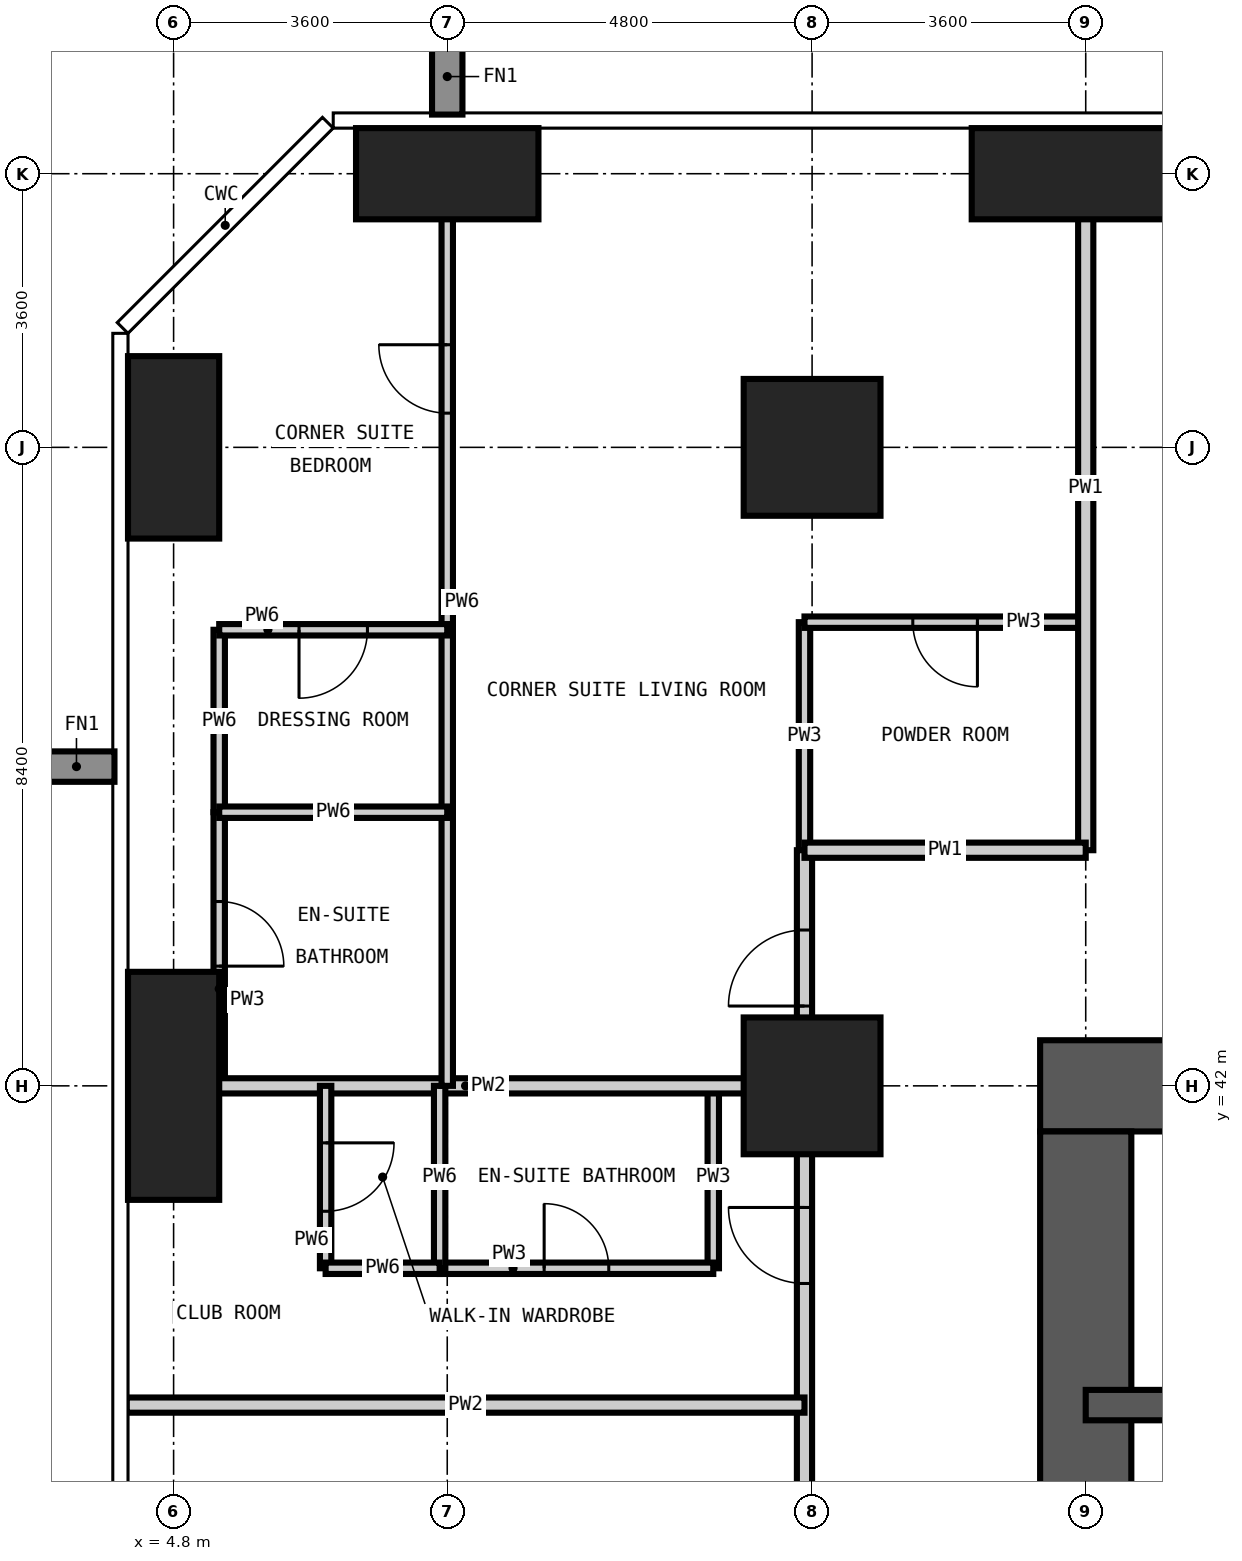
"""IFC4 building model, lengths in metres.
Left out: names, types, materials, properties, quantities, classifications, styles, units other than length and angle.
Written with IfcOpenShell. Run it as: python <this file> out.ifc"""

import sys

from ifc_helpers import new_model, si_unit, direction, frame, frame_2d, origin, origin_2d, place, context, subcontext, project, spatial, rectangle, extrude, element, fill, save


model = new_model("IFC4")
c1 = context("Model", 3, precision=1e-05, world=origin(), true_north=direction((0.0, 1.0)))
c2 = subcontext(c1, "Body", "Model", "MODEL_VIEW")
j1 = project(units=[si_unit("LENGTHUNIT", "METRE"), si_unit("PLANEANGLEUNIT", "RADIAN")], contexts=[c1])
p1 = place(None, origin())
s1 = spatial("IfcSite", under=j1, at=p1, CompositionType="ELEMENT")
p2 = place(p1, origin())
s2 = spatial("IfcBuilding", under=s1, at=p2, CompositionType="ELEMENT")
p3 = place(p2, frame((0.0, 0.0, 216.6)))
s3 = spatial("IfcBuildingStorey", under=s2, at=p3, CompositionType="ELEMENT", Elevation=216.6)
p4 = place(p3, frame((4.8, 42.0, -0.35), z_axis=(0.0, 0.0, 1.0), x_axis=(1.0, 0.0, 0.0)))
e1 = element("IfcColumn", 1, at=p4, inside=s3, PredefinedType="COLUMN", context=c2, shape_type="SweptSolid", body=[
    extrude(rectangle(XDim=1.2, YDim=3.0, at=origin_2d()), origin(), (0.0, 0.0, 1.0), 3.55),
])
p5 = place(p3, frame((4.8, 50.4, -0.35), z_axis=(0.0, 0.0, 1.0), x_axis=(1.0, 0.0, 0.0)))
e2 = element("IfcColumn", 2, at=p5, inside=s3, PredefinedType="COLUMN", context=c2, shape_type="SweptSolid", body=[
    extrude(rectangle(XDim=1.2, YDim=2.4, at=origin_2d()), origin(), (0.0, 0.0, 1.0), 3.55),
])
p6 = place(p3, frame((8.4, 54.0, -0.35), z_axis=(0.0, 0.0, 1.0), x_axis=(1.0, 0.0, 0.0)))
e3 = element("IfcColumn", 3, at=p6, inside=s3, PredefinedType="COLUMN", context=c2, shape_type="SweptSolid", body=[
    extrude(rectangle(XDim=2.4, YDim=1.2, at=origin_2d()), origin(), (0.0, 0.0, 1.0), 3.55),
])
for number, where, z_axis, x_axis in (
    (4, (13.2, 42.0, -0.35), (0.0, 0.0, 1.0), (1.0, 0.0, 0.0)),
    (5, (13.2, 50.4, -0.35), (0.0, 0.0, 1.0), (1.0, 0.0, 0.0)),
):
    element("IfcColumn", number, at=place(p3, frame(where, z_axis=z_axis, x_axis=x_axis)), inside=s3, PredefinedType="COLUMN", context=c2, shape_type="SweptSolid", body=[
        extrude(rectangle(XDim=1.8, YDim=1.8, at=origin_2d()), origin(), (0.0, 0.0, 1.0), 3.55),
    ])
p7 = place(p3, frame((16.8, 54.0, -0.35), z_axis=(0.0, 0.0, 1.0), x_axis=(1.0, 0.0, 0.0)))
e6 = element("IfcColumn", 6, at=p7, inside=s3, PredefinedType="COLUMN", context=c2, shape_type="SweptSolid", body=[
    extrude(rectangle(XDim=3.0, YDim=1.2, at=origin_2d()), origin(), (0.0, 0.0, 1.0), 3.55),
])
p8 = place(p3, frame((42.6, 42.0, -0.35), z_axis=(0.0, 0.0, 1.0), x_axis=(-1.0, 0.0, 0.0)))
e7 = element("IfcWall", 7, at=p8, inside=s3, PredefinedType="SHEAR", context=c2, shape_type="SweptSolid", body=[
    extrude(rectangle(XDim=26.4, YDim=1.2, at=frame_2d((13.2, 0.0))), origin(), (0.0, 0.0, 1.0), 3.55),
])
p9 = place(p8, frame((21.1, 0.0, 0.35)))
e8 = element("IfcOpeningElement", 8, at=p9, cuts=e7, PredefinedType="OPENING", context=c2, shape_type="SweptSolid", body=[
    extrude(rectangle(XDim=1.0, YDim=2.1, at=frame_2d((0.5, 1.05))), frame((0.0, 0.61, 0.0), z_axis=(0.0, -1.0, 0.0), x_axis=(1.0, 0.0, 0.0)), (0.0, 0.0, 1.0), 1.22),
])
p10 = place(p8, frame((10.5, 0.0, 0.35)))
e9 = element("IfcOpeningElement", 9, at=p10, cuts=e7, PredefinedType="OPENING", context=c2, shape_type="SweptSolid", body=[
    extrude(rectangle(XDim=1.2, YDim=2.2, at=frame_2d((0.6, 1.1))), frame((0.0, 0.61, 0.0), z_axis=(0.0, -1.0, 0.0), x_axis=(1.0, 0.0, 0.0)), (0.0, 0.0, 1.0), 1.22),
])
p11 = place(p3, frame((16.8, 41.4, -0.35), z_axis=(0.0, 0.0, 1.0), x_axis=(0.0, -1.0, 0.0)))
e10 = element("IfcWall", 10, at=p11, inside=s3, PredefinedType="SHEAR", context=c2, shape_type="SweptSolid", body=[
    extrude(rectangle(XDim=24.0, YDim=1.2, at=frame_2d((12.0, 0.0))), origin(), (0.0, 0.0, 1.0), 3.55),
])
p12 = place(p11, frame((11.1, 0.0, 0.35)))
e11 = element("IfcOpeningElement", 11, at=p12, cuts=e10, PredefinedType="OPENING", context=c2, shape_type="SweptSolid", body=[
    extrude(rectangle(XDim=1.8, YDim=2.2, at=frame_2d((0.9, 1.1))), frame((0.0, 0.61, 0.0), z_axis=(0.0, -1.0, 0.0), x_axis=(1.0, 0.0, 0.0)), (0.0, 0.0, 1.0), 1.22),
])
p13 = place(p11, frame((19.9, 0.0, 0.35)))
e12 = element("IfcOpeningElement", 12, at=p13, cuts=e10, PredefinedType="OPENING", context=c2, shape_type="SweptSolid", body=[
    extrude(rectangle(XDim=1.0, YDim=2.1, at=frame_2d((0.5, 1.05))), frame((0.0, 0.61, 0.0), z_axis=(0.0, -1.0, 0.0), x_axis=(1.0, 0.0, 0.0)), (0.0, 0.0, 1.0), 1.22),
])
p14 = place(p11, frame((5.2, 0.0, 0.35)))
e13 = element("IfcOpeningElement", 13, at=p14, cuts=e10, PredefinedType="OPENING", context=c2, shape_type="SweptSolid", body=[
    extrude(rectangle(XDim=1.0, YDim=2.1, at=frame_2d((0.5, 1.05))), frame((0.0, 0.61, 0.0), z_axis=(0.0, -1.0, 0.0), x_axis=(1.0, 0.0, 0.0)), (0.0, 0.0, 1.0), 1.22),
])
p15 = place(p3, frame((16.8, 37.8, -0.35), z_axis=(0.0, 0.0, 1.0), x_axis=(1.0, 0.0, 0.0)))
e14 = element("IfcWall", 14, at=p15, inside=s3, PredefinedType="SHEAR", context=c2, shape_type="SweptSolid", body=[
    extrude(rectangle(XDim=8.4, YDim=0.4, at=frame_2d((4.2, 0.0))), origin(), (0.0, 0.0, 1.0), 3.55),
])
p16 = place(p3, frame((5.4, 42.0, 0.0), z_axis=(0.0, 0.0, 1.0), x_axis=(0.0, 1.0, 0.0)))
e15 = element("IfcWall", 15, at=p16, inside=s3, PredefinedType="PARTITIONING", context=c2, shape_type="SweptSolid", body=[
    extrude(rectangle(XDim=3.6, YDim=0.15, at=frame_2d((1.8, 0.0))), origin(), (0.0, 0.0, 1.0), 3.2),
])
p17 = place(p16, frame((1.575, 0.0, 0.0)))
e16 = element("IfcOpeningElement", 16, at=p17, cuts=e15, PredefinedType="OPENING", context=c2, shape_type="SweptSolid", body=[
    extrude(rectangle(XDim=0.85, YDim=2.1, at=frame_2d((0.425, 1.05))), frame((0.0, 0.085, 0.0), z_axis=(0.0, -1.0, 0.0), x_axis=(1.0, 0.0, 0.0)), (0.0, 0.0, 1.0), 0.17),
])
p18 = place(p3, frame((11.9, 39.6, 0.0), z_axis=(0.0, 0.0, 1.0), x_axis=(0.0, 1.0, 0.0)))
e17 = element("IfcWall", 17, at=p18, inside=s3, PredefinedType="PARTITIONING", context=c2, shape_type="SweptSolid", body=[
    extrude(rectangle(XDim=2.4, YDim=0.15, at=frame_2d((1.2, 0.0))), origin(), (0.0, 0.0, 1.0), 3.2),
])
p19 = place(p3, frame((13.1, 45.1, 0.0), z_axis=(0.0, 0.0, 1.0), x_axis=(0.0, 1.0, 0.0)))
e18 = element("IfcWall", 18, at=p19, inside=s3, PredefinedType="PARTITIONING", context=c2, shape_type="SweptSolid", body=[
    extrude(rectangle(XDim=3.0, YDim=0.15, at=frame_2d((1.5, 0.0))), origin(), (0.0, 0.0, 1.0), 3.2),
])
p20 = place(p3, frame((8.3, 39.6, 0.0), z_axis=(0.0, 0.0, 1.0), x_axis=(1.0, 0.0, 0.0)))
e19 = element("IfcWall", 19, at=p20, inside=s3, PredefinedType="PARTITIONING", context=c2, shape_type="SweptSolid", body=[
    extrude(rectangle(XDim=3.6, YDim=0.15, at=frame_2d((1.8, 0.0))), origin(), (0.0, 0.0, 1.0), 3.2),
])
p21 = place(p20, frame((1.375, 0.0, 0.0)))
e20 = element("IfcOpeningElement", 20, at=p21, cuts=e19, PredefinedType="OPENING", context=c2, shape_type="SweptSolid", body=[
    extrude(rectangle(XDim=0.85, YDim=2.1, at=frame_2d((0.425, 1.05))), frame((0.0, 0.085, 0.0), z_axis=(0.0, -1.0, 0.0), x_axis=(1.0, 0.0, 0.0)), (0.0, 0.0, 1.0), 0.17),
])
p22 = place(p3, frame((13.1, 48.1, 0.0), z_axis=(0.0, 0.0, 1.0), x_axis=(1.0, 0.0, 0.0)))
e21 = element("IfcWall", 21, at=p22, inside=s3, PredefinedType="PARTITIONING", context=c2, shape_type="SweptSolid", body=[
    extrude(rectangle(XDim=3.7, YDim=0.15, at=frame_2d((1.85, 0.0))), origin(), (0.0, 0.0, 1.0), 3.2),
])
p23 = place(p22, frame((1.425, 0.0, 0.0)))
e22 = element("IfcOpeningElement", 22, at=p23, cuts=e21, PredefinedType="OPENING", context=c2, shape_type="SweptSolid", body=[
    extrude(rectangle(XDim=0.85, YDim=2.1, at=frame_2d((0.425, 1.05))), frame((0.0, 0.085, 0.0), z_axis=(0.0, -1.0, 0.0), x_axis=(1.0, 0.0, 0.0)), (0.0, 0.0, 1.0), 0.17),
])
p24 = place(p3, frame((13.1, 13.1, 0.0), z_axis=(0.0, 0.0, 1.0), x_axis=(0.0, 1.0, 0.0)))
e23 = element("IfcWall", 23, at=p24, inside=s3, PredefinedType="PARTITIONING", context=c2, shape_type="SweptSolid", body=[
    extrude(rectangle(XDim=32.0, YDim=0.2, at=frame_2d((16.0, 0.0))), origin(), (0.0, 0.0, 1.0), 3.2),
])
p25 = place(p24, frame((5.3, 0.0, 0.0)))
e24 = element("IfcOpeningElement", 24, at=p25, cuts=e23, PredefinedType="OPENING", context=c2, shape_type="SweptSolid", body=[
    extrude(rectangle(XDim=1.0, YDim=2.2, at=frame_2d((0.5, 1.1))), frame((0.0, 0.11, 0.0), z_axis=(0.0, -1.0, 0.0), x_axis=(1.0, 0.0, 0.0)), (0.0, 0.0, 1.0), 0.22),
])
p26 = place(p24, frame((13.1, 0.0, 0.0)))
e25 = element("IfcOpeningElement", 25, at=p26, cuts=e23, PredefinedType="OPENING", context=c2, shape_type="SweptSolid", body=[
    extrude(rectangle(XDim=1.0, YDim=2.2, at=frame_2d((0.5, 1.1))), frame((0.0, 0.11, 0.0), z_axis=(0.0, -1.0, 0.0), x_axis=(1.0, 0.0, 0.0)), (0.0, 0.0, 1.0), 0.22),
])
p27 = place(p24, frame((18.5, 0.0, 0.0)))
e26 = element("IfcOpeningElement", 26, at=p27, cuts=e23, PredefinedType="OPENING", context=c2, shape_type="SweptSolid", body=[
    extrude(rectangle(XDim=1.0, YDim=2.2, at=frame_2d((0.5, 1.1))), frame((0.0, 0.11, 0.0), z_axis=(0.0, -1.0, 0.0), x_axis=(1.0, 0.0, 0.0)), (0.0, 0.0, 1.0), 0.22),
])
p28 = place(p24, frame((26.3, 0.0, 0.0)))
e27 = element("IfcOpeningElement", 27, at=p28, cuts=e23, PredefinedType="OPENING", context=c2, shape_type="SweptSolid", body=[
    extrude(rectangle(XDim=1.0, YDim=2.2, at=frame_2d((0.5, 1.1))), frame((0.0, 0.11, 0.0), z_axis=(0.0, -1.0, 0.0), x_axis=(1.0, 0.0, 0.0)), (0.0, 0.0, 1.0), 0.22),
])
p29 = place(p24, frame((1.35, 0.0, 0.0)))
e28 = element("IfcOpeningElement", 28, at=p29, cuts=e23, PredefinedType="OPENING", context=c2, shape_type="SweptSolid", body=[
    extrude(rectangle(XDim=1.0, YDim=2.2, at=frame_2d((0.5, 1.1))), frame((0.0, 0.11, 0.0), z_axis=(0.0, -1.0, 0.0), x_axis=(1.0, 0.0, 0.0)), (0.0, 0.0, 1.0), 0.22),
])
p30 = place(p24, frame((29.95, 0.0, 0.0)))
e29 = element("IfcOpeningElement", 29, at=p30, cuts=e23, PredefinedType="OPENING", context=c2, shape_type="SweptSolid", body=[
    extrude(rectangle(XDim=1.0, YDim=2.2, at=frame_2d((0.5, 1.1))), frame((0.0, 0.11, 0.0), z_axis=(0.0, -1.0, 0.0), x_axis=(1.0, 0.0, 0.0)), (0.0, 0.0, 1.0), 0.22),
])
p31 = place(p3, frame((16.8, 45.1, 0.0), z_axis=(0.0, 0.0, 1.0), x_axis=(0.0, 1.0, 0.0)))
e30 = element("IfcWall", 30, at=p31, inside=s3, PredefinedType="PARTITIONING", context=c2, shape_type="SweptSolid", body=[
    extrude(rectangle(XDim=9.518, YDim=0.2, at=frame_2d((4.759, 0.0))), origin(), (0.0, 0.0, 1.0), 3.2),
])
p32 = place(p3, frame((13.1, 45.1, 0.0), z_axis=(0.0, 0.0, 1.0), x_axis=(1.0, 0.0, 0.0)))
e31 = element("IfcWall", 31, at=p32, inside=s3, PredefinedType="PARTITIONING", context=c2, shape_type="SweptSolid", body=[
    extrude(rectangle(XDim=3.7, YDim=0.2, at=frame_2d((1.85, 0.0))), origin(), (0.0, 0.0, 1.0), 3.2),
])
for number, where, z_axis, x_axis in (
    (32, (4.182, 37.8, 0.0), (0.0, 0.0, 1.0), (1.0, 0.0, 0.0)),
    (33, (4.182, 42.0, 0.0), (0.0, 0.0, 1.0), (1.0, 0.0, 0.0)),
):
    element("IfcWall", number, at=place(p3, frame(where, z_axis=z_axis, x_axis=x_axis)), inside=s3, PredefinedType="PARTITIONING", context=c2, shape_type="SweptSolid", body=[
        extrude(rectangle(XDim=8.918, YDim=0.2, at=frame_2d((4.459, 0.0))), origin(), (0.0, 0.0, 1.0), 3.2),
    ])
p33 = place(p3, frame((5.4, 45.6, 0.0), z_axis=(0.0, 0.0, 1.0), x_axis=(0.0, 1.0, 0.0)))
e34 = element("IfcWall", 34, at=p33, inside=s3, PredefinedType="PARTITIONING", context=c2, shape_type="SweptSolid", body=[
    extrude(rectangle(XDim=2.4, YDim=0.15, at=frame_2d((1.2, 0.0))), origin(), (0.0, 0.0, 1.0), 3.2),
])
p34 = place(p3, frame((6.8, 39.6, 0.0), z_axis=(0.0, 0.0, 1.0), x_axis=(0.0, 1.0, 0.0)))
e35 = element("IfcWall", 35, at=p34, inside=s3, PredefinedType="PARTITIONING", context=c2, shape_type="SweptSolid", body=[
    extrude(rectangle(XDim=2.4, YDim=0.15, at=frame_2d((1.2, 0.0))), origin(), (0.0, 0.0, 1.0), 3.2),
])
p35 = place(p34, frame((0.75, 0.0, 0.0)))
e36 = element("IfcOpeningElement", 36, at=p35, cuts=e35, PredefinedType="OPENING", context=c2, shape_type="SweptSolid", body=[
    extrude(rectangle(XDim=0.9, YDim=2.1, at=frame_2d((0.45, 1.05))), frame((0.0, 0.085, 0.0), z_axis=(0.0, -1.0, 0.0), x_axis=(1.0, 0.0, 0.0)), (0.0, 0.0, 1.0), 0.17),
])
p36 = place(p3, frame((8.3, 39.6, 0.0), z_axis=(0.0, 0.0, 1.0), x_axis=(0.0, 1.0, 0.0)))
e37 = element("IfcWall", 37, at=p36, inside=s3, PredefinedType="PARTITIONING", context=c2, shape_type="SweptSolid", body=[
    extrude(rectangle(XDim=2.4, YDim=0.15, at=frame_2d((1.2, 0.0))), origin(), (0.0, 0.0, 1.0), 3.2),
])
p37 = place(p3, frame((8.4, 42.0, 0.0), z_axis=(0.0, 0.0, 1.0), x_axis=(0.0, 1.0, 0.0)))
e38 = element("IfcWall", 38, at=p37, inside=s3, PredefinedType="PARTITIONING", context=c2, shape_type="SweptSolid", body=[
    extrude(rectangle(XDim=12.618, YDim=0.15, at=frame_2d((6.309, 0.0))), origin(), (0.0, 0.0, 1.0), 3.2),
])
p38 = place(p37, frame((8.85, 0.0, 0.0)))
e39 = element("IfcOpeningElement", 39, at=p38, cuts=e38, PredefinedType="OPENING", context=c2, shape_type="SweptSolid", body=[
    extrude(rectangle(XDim=0.9, YDim=2.1, at=frame_2d((0.45, 1.05))), frame((0.0, 0.085, 0.0), z_axis=(0.0, -1.0, 0.0), x_axis=(1.0, 0.0, 0.0)), (0.0, 0.0, 1.0), 0.17),
])
p39 = place(p3, frame((6.8, 39.6, 0.0), z_axis=(0.0, 0.0, 1.0), x_axis=(1.0, 0.0, 0.0)))
e40 = element("IfcWall", 40, at=p39, inside=s3, PredefinedType="PARTITIONING", context=c2, shape_type="SweptSolid", body=[
    extrude(rectangle(XDim=1.5, YDim=0.15, at=frame_2d((0.75, 0.0))), origin(), (0.0, 0.0, 1.0), 3.2),
])
p40 = place(p3, frame((5.4, 45.6, 0.0), z_axis=(0.0, 0.0, 1.0), x_axis=(1.0, 0.0, 0.0)))
e41 = element("IfcWall", 41, at=p40, inside=s3, PredefinedType="PARTITIONING", context=c2, shape_type="SweptSolid", body=[
    extrude(rectangle(XDim=3.0, YDim=0.15, at=frame_2d((1.5, 0.0))), origin(), (0.0, 0.0, 1.0), 3.2),
])
p41 = place(p3, frame((5.4, 48.0, 0.0), z_axis=(0.0, 0.0, 1.0), x_axis=(1.0, 0.0, 0.0)))
e42 = element("IfcWall", 42, at=p41, inside=s3, PredefinedType="PARTITIONING", context=c2, shape_type="SweptSolid", body=[
    extrude(rectangle(XDim=3.0, YDim=0.15, at=frame_2d((1.5, 0.0))), origin(), (0.0, 0.0, 1.0), 3.2),
])
p42 = place(p41, frame((1.05, 0.0, 0.0)))
e43 = element("IfcOpeningElement", 43, at=p42, cuts=e42, PredefinedType="OPENING", context=c2, shape_type="SweptSolid", body=[
    extrude(rectangle(XDim=0.9, YDim=2.1, at=frame_2d((0.45, 1.05))), frame((0.0, 0.085, 0.0), z_axis=(0.0, -1.0, 0.0), x_axis=(1.0, 0.0, 0.0)), (0.0, 0.0, 1.0), 0.17),
])
p43 = place(p28, origin())
e44 = element("IfcDoor", 44, at=p43, inside=s3, OperationType="SINGLE_SWING_RIGHT", PredefinedType="DOOR", context=c2, shape_type="SweptSolid", body=[
    extrude(rectangle(XDim=1.0, YDim=2.2, at=frame_2d((0.5, 1.1))), frame((0.0, 0.025, 0.0), z_axis=(0.0, -1.0, 0.0), x_axis=(1.0, 0.0, 0.0)), (0.0, 0.0, 1.0), 0.05),
])
fill(e27, e44)
p44 = place(p21, origin())
e45 = element("IfcDoor", 45, at=p44, inside=s3, OperationType="SINGLE_SWING_LEFT", PredefinedType="DOOR", context=c2, shape_type="SweptSolid", body=[
    extrude(rectangle(XDim=0.85, YDim=2.1, at=frame_2d((0.425, 1.05))), frame((0.0, 0.025, 0.0), z_axis=(0.0, -1.0, 0.0), x_axis=(1.0, 0.0, 0.0)), (0.0, 0.0, 1.0), 0.05),
])
fill(e20, e45)
p45 = place(p35, frame((0.9, 0.0, 0.0), z_axis=(0.0, 0.0, 1.0), x_axis=(-1.0, 0.0, 0.0)))
e46 = element("IfcDoor", 46, at=p45, inside=s3, OperationType="SINGLE_SWING_LEFT", PredefinedType="DOOR", context=c2, shape_type="SweptSolid", body=[
    extrude(rectangle(XDim=0.9, YDim=2.1, at=frame_2d((0.45, 1.05))), frame((0.0, 0.025, 0.0), z_axis=(0.0, -1.0, 0.0), x_axis=(1.0, 0.0, 0.0)), (0.0, 0.0, 1.0), 0.05),
])
fill(e36, e46)
p46 = place(p30, origin())
e47 = element("IfcDoor", 47, at=p46, inside=s3, OperationType="SINGLE_SWING_LEFT", PredefinedType="DOOR", context=c2, shape_type="SweptSolid", body=[
    extrude(rectangle(XDim=1.0, YDim=2.2, at=frame_2d((0.5, 1.1))), frame((0.0, 0.025, 0.0), z_axis=(0.0, -1.0, 0.0), x_axis=(1.0, 0.0, 0.0)), (0.0, 0.0, 1.0), 0.05),
])
fill(e29, e47)
p47 = place(p23, frame((0.85, 0.0, 0.0), z_axis=(0.0, 0.0, 1.0), x_axis=(-1.0, 0.0, 0.0)))
e48 = element("IfcDoor", 48, at=p47, inside=s3, OperationType="SINGLE_SWING_LEFT", PredefinedType="DOOR", context=c2, shape_type="SweptSolid", body=[
    extrude(rectangle(XDim=0.85, YDim=2.1, at=frame_2d((0.425, 1.05))), frame((0.0, 0.025, 0.0), z_axis=(0.0, -1.0, 0.0), x_axis=(1.0, 0.0, 0.0)), (0.0, 0.0, 1.0), 0.05),
])
fill(e22, e48)
p48 = place(p38, origin())
e49 = element("IfcDoor", 49, at=p48, inside=s3, OperationType="SINGLE_SWING_RIGHT", PredefinedType="DOOR", context=c2, shape_type="SweptSolid", body=[
    extrude(rectangle(XDim=0.9, YDim=2.1, at=frame_2d((0.45, 1.05))), frame((0.0, 0.025, 0.0), z_axis=(0.0, -1.0, 0.0), x_axis=(1.0, 0.0, 0.0)), (0.0, 0.0, 1.0), 0.05),
])
fill(e39, e49)
p49 = place(p17, frame((0.85, 0.0, 0.0), z_axis=(0.0, 0.0, 1.0), x_axis=(-1.0, 0.0, 0.0)))
e50 = element("IfcDoor", 50, at=p49, inside=s3, OperationType="SINGLE_SWING_RIGHT", PredefinedType="DOOR", context=c2, shape_type="SweptSolid", body=[
    extrude(rectangle(XDim=0.85, YDim=2.1, at=frame_2d((0.425, 1.05))), frame((0.0, 0.025, 0.0), z_axis=(0.0, -1.0, 0.0), x_axis=(1.0, 0.0, 0.0)), (0.0, 0.0, 1.0), 0.05),
])
fill(e16, e50)
p50 = place(p42, frame((0.9, 0.0, 0.0), z_axis=(0.0, 0.0, 1.0), x_axis=(-1.0, 0.0, 0.0)))
e51 = element("IfcDoor", 51, at=p50, inside=s3, OperationType="SINGLE_SWING_RIGHT", PredefinedType="DOOR", context=c2, shape_type="SweptSolid", body=[
    extrude(rectangle(XDim=0.9, YDim=2.1, at=frame_2d((0.45, 1.05))), frame((0.0, 0.025, 0.0), z_axis=(0.0, -1.0, 0.0), x_axis=(1.0, 0.0, 0.0)), (0.0, 0.0, 1.0), 0.05),
])
fill(e43, e51)
save(model, sys.argv[1])
